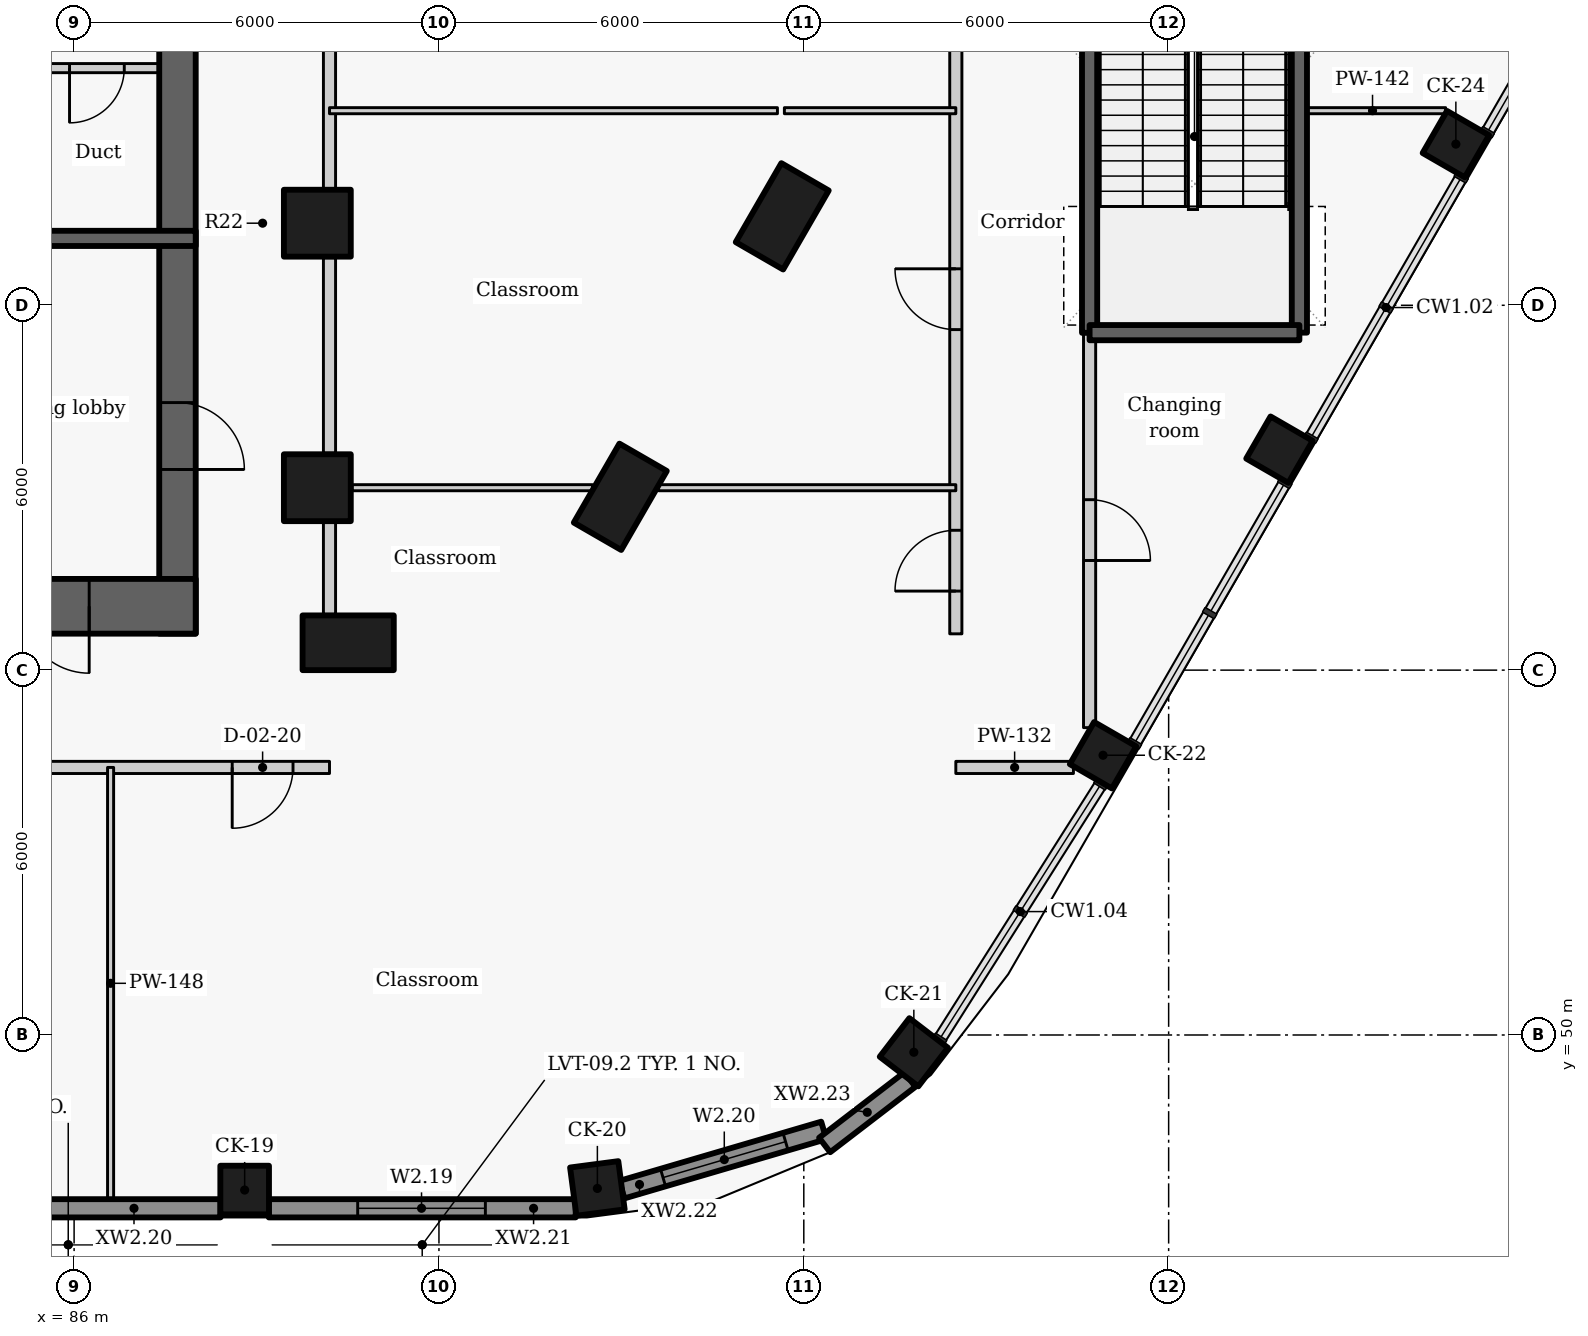
"""IFC4 building model, lengths in metres.
Left out: names, types, materials, properties, quantities, classifications, styles, units other than length and angle.
Written with IfcOpenShell. Run it as: python <this file> out.ifc"""

import sys

from ifc_helpers import new_model, si_unit, direction, frame, frame_2d, origin, origin_2d, place, context, subcontext, project, spatial, rectangle, extrude, element, fill, save


model = new_model("IFC4")
c1 = context("Model", 3, precision=1e-05, world=origin(), true_north=direction((0.0, 1.0)))
c2 = subcontext(c1, "Body", "Model", "MODEL_VIEW")
j1 = project(units=[si_unit("LENGTHUNIT", "METRE"), si_unit("PLANEANGLEUNIT", "RADIAN")], contexts=[c1])
p1 = place(None, origin())
s1 = spatial("IfcSite", under=j1, at=p1, CompositionType="ELEMENT")
p2 = place(p1, origin())
s2 = spatial("IfcBuilding", under=s1, at=p2, CompositionType="ELEMENT")
p3 = place(p2, frame((0.0, 0.0, 19.8)))
s3 = spatial("IfcBuildingStorey", under=s2, at=p3, CompositionType="ELEMENT", Elevation=19.8)
for number, where, z_axis, x_axis in (
    (1, (90.507, 56.45, 0.0), (0.0, 0.0, 1.0), (1.0, 0.0, 0.0)),
    (2, (94.982, 58.851, 0.0), (0.0, 0.0, 1.0), (0.5, 0.866, 0.0)),
    (3, (97.646, 63.463, 0.0), (0.0, 0.0, 1.0), (0.5, 0.866, 0.0)),
):
    element("IfcColumn", number, at=place(p3, frame(where, z_axis=z_axis, x_axis=x_axis)), inside=s3, PredefinedType="COLUMN", context=c2, shape_type="SweptSolid", body=[
        extrude(rectangle(XDim=1.5, YDim=0.9, at=origin_2d()), origin(), (0.0, 0.0, 1.0), 4.2),
    ])
for number, where, z_axis, x_axis in (
    (4, (90.0, 59.0, 0.0), (0.0, 0.0, 1.0), (0.0, 1.0, 0.0)),
    (5, (90.0, 63.35, 0.0), (0.0, 0.0, 1.0), (0.0, 1.0, 0.0)),
):
    element("IfcColumn", number, at=place(p3, frame(where, z_axis=z_axis, x_axis=x_axis)), inside=s3, PredefinedType="COLUMN", context=c2, shape_type="SweptSolid", body=[
        extrude(rectangle(XDim=1.1, YDim=1.1, at=origin_2d()), origin(), (0.0, 0.0, 1.0), 4.2),
    ])
for number, where, z_axis, x_axis in (
    (6, (88.805, 47.45, 0.0), (0.0, 0.0, 1.0), (1.0, 0.0, 0.0)),
    (7, (94.605, 47.477, 0.0), (0.0, 0.0, 1.0), (0.991, 0.131, 0.0)),
    (8, (99.81, 49.716, 0.0), (0.0, 0.0, 1.0), (0.609, 0.793, 0.0)),
    (9, (102.921, 54.6, 0.0), (0.0, 0.0, 1.0), (0.5, 0.866, 0.0)),
    (10, (105.822, 59.625, 0.0), (0.0, 0.0, 1.0), (0.5, 0.866, 0.0)),
    (11, (108.723, 64.65, 0.0), (0.0, 0.0, 1.0), (0.5, 0.866, 0.0)),
):
    element("IfcColumn", number, at=place(p3, frame(where, z_axis=z_axis, x_axis=x_axis)), inside=s3, PredefinedType="COLUMN", context=c2, shape_type="SweptSolid", body=[
        extrude(rectangle(XDim=0.8, YDim=0.8, at=origin_2d()), origin(), (0.0, 0.0, 1.0), 4.2),
    ])
p4 = place(p3, frame((83.398, 47.15, 0.0), z_axis=(0.0, 0.0, 1.0), x_axis=(1.0, 0.0, 0.0)))
e12 = element("IfcWall", 12, at=p4, inside=s3, PredefinedType="SOLIDWALL", context=c2, shape_type="SweptSolid", body=[
    extrude(rectangle(XDim=5.01, YDim=0.3, at=frame_2d((2.505, 0.0))), origin(), (0.0, 0.0, 1.0), 3.0),
])
p5 = place(p4, frame((1.163, 0.0, 1.5)))
e13 = element("IfcOpeningElement", 13, at=p5, cuts=e12, PredefinedType="OPENING", context=c2, shape_type="SweptSolid", body=[
    extrude(rectangle(XDim=0.9, YDim=1.45, at=frame_2d((0.45, 0.725))), frame((0.0, 0.16, 0.0), z_axis=(0.0, -1.0, 0.0), x_axis=(1.0, 0.0, 0.0)), (0.0, 0.0, 1.0), 0.32),
])
p6 = place(p3, frame((89.201, 47.15, 0.0), z_axis=(0.0, 0.0, 1.0), x_axis=(1.0, 0.0, 0.0)))
e14 = element("IfcWall", 14, at=p6, inside=s3, PredefinedType="SOLIDWALL", context=c2, shape_type="SweptSolid", body=[
    extrude(rectangle(XDim=5.048, YDim=0.3, at=frame_2d((2.524, 0.0))), origin(), (0.0, 0.0, 1.0), 3.0),
])
p7 = place(p6, frame((1.463, 0.0, 0.9)))
e15 = element("IfcOpeningElement", 15, at=p7, cuts=e14, PredefinedType="OPENING", context=c2, shape_type="SweptSolid", body=[
    extrude(rectangle(XDim=2.1, YDim=2.05, at=frame_2d((1.05, 1.025))), frame((0.0, 0.16, 0.0), z_axis=(0.0, -1.0, 0.0), x_axis=(1.0, 0.0, 0.0)), (0.0, 0.0, 1.0), 0.32),
])
p8 = place(p3, frame((95.007, 47.457, 0.0), z_axis=(0.0, 0.0, 1.0), x_axis=(0.959578633815, 0.281440660756, 0.0)))
e16 = element("IfcWall", 16, at=p8, inside=s3, PredefinedType="SOLIDWALL", context=c2, shape_type="SweptSolid", body=[
    extrude(rectangle(XDim=3.461, YDim=0.3, at=frame_2d((1.73, 0.0))), origin(), (0.0, 0.0, 1.0), 3.0),
])
p9 = place(p8, frame((0.706, 0.0, 0.9)))
e17 = element("IfcOpeningElement", 17, at=p9, cuts=e16, PredefinedType="OPENING", context=c2, shape_type="SweptSolid", body=[
    extrude(rectangle(XDim=2.1, YDim=2.05, at=frame_2d((1.05, 1.025))), frame((0.0, 0.16, 0.0), z_axis=(0.0, -1.0, 0.0), x_axis=(1.0, 0.0, 0.0)), (0.0, 0.0, 1.0), 0.32),
])
p10 = place(p3, frame((98.343, 48.191, 0.0), z_axis=(0.0, 0.0, 1.0), x_axis=(0.793403972369, 0.608695438318, 0.0)))
e18 = element("IfcWall", 18, at=p10, inside=s3, PredefinedType="SOLIDWALL", context=c2, shape_type="SweptSolid", body=[
    extrude(rectangle(XDim=1.767, YDim=0.3, at=frame_2d((0.884, 0.0))), origin(), (0.0, 0.0, 1.0), 3.0),
])
p11 = place(p3, frame((87.7, 72.2, -0.3), z_axis=(0.0, 0.0, 1.0), x_axis=(0.0, -1.0, 0.0)))
e19 = element("IfcWall", 19, at=p11, inside=s3, PredefinedType="SHEAR", context=c2, shape_type="SweptSolid", body=[
    extrude(rectangle(XDim=15.6, YDim=0.6, at=frame_2d((7.8, 0.0))), origin(), (0.0, 0.0, 1.0), 4.2),
])
p12 = place(p11, frame((11.8, 0.0, 0.3)))
e20 = element("IfcOpeningElement", 20, at=p12, cuts=e19, PredefinedType="OPENING", context=c2, shape_type="SweptSolid", body=[
    extrude(rectangle(XDim=1.1, YDim=2.1, at=frame_2d((0.55, 1.05))), frame((0.0, 0.31, 0.0), z_axis=(0.0, -1.0, 0.0), x_axis=(1.0, 0.0, 0.0)), (0.0, 0.0, 1.0), 0.62),
])
p13 = place(p3, frame((88.0, 65.9, 0.0), z_axis=(0.0, 0.0, 1.0), x_axis=(-1.0, 0.0, 0.0)))
e21 = element("IfcWall", 21, at=p13, inside=s3, PredefinedType="PARTITIONING", context=c2, shape_type="SweptSolid", body=[
    extrude(rectangle(XDim=2.603, YDim=0.15, at=frame_2d((1.302, 0.0))), origin(), (0.0, 0.0, 1.0), 3.9),
])
p14 = place(p13, frame((1.175, 0.0, 0.0)))
e22 = element("IfcOpeningElement", 22, at=p14, cuts=e21, PredefinedType="OPENING", context=c2, shape_type="SweptSolid", body=[
    extrude(rectangle(XDim=0.9, YDim=2.1, at=frame_2d((0.45, 1.05))), frame((0.0, 0.085, 0.0), z_axis=(0.0, -1.0, 0.0), x_axis=(1.0, 0.0, 0.0)), (0.0, 0.0, 1.0), 0.17),
])
p15 = place(p3, frame((80.0, 63.1, -0.3), z_axis=(0.0, 0.0, 1.0), x_axis=(1.0, 0.0, 0.0)))
e23 = element("IfcWall", 23, at=p15, inside=s3, PredefinedType="SHEAR", context=c2, shape_type="SweptSolid", body=[
    extrude(rectangle(XDim=8.0, YDim=0.25, at=frame_2d((4.0, 0.0))), origin(), (0.0, 0.0, 1.0), 4.2),
])
p16 = place(p15, frame((3.849, 0.0, 0.3)))
e24 = element("IfcOpeningElement", 24, at=p16, cuts=e23, PredefinedType="OPENING", context=c2, shape_type="SweptSolid", body=[
    extrude(rectangle(XDim=1.1, YDim=2.1, at=frame_2d((0.55, 1.05))), frame((0.0, 0.135, 0.0), z_axis=(0.0, -1.0, 0.0), x_axis=(1.0, 0.0, 0.0)), (0.0, 0.0, 1.0), 0.27),
])
p17 = place(p3, frame((88.0, 57.05, -0.3), z_axis=(0.0, 0.0, 1.0), x_axis=(-1.0, 0.0, 0.0)))
e25 = element("IfcWall", 25, at=p17, inside=s3, PredefinedType="SHEAR", context=c2, shape_type="SweptSolid", body=[
    extrude(rectangle(XDim=4.6, YDim=0.9, at=frame_2d((2.3, 0.0))), origin(), (0.0, 0.0, 1.0), 4.2),
])
p18 = place(p17, frame((1.752, 0.0, 0.3)))
e26 = element("IfcOpeningElement", 26, at=p18, cuts=e25, PredefinedType="OPENING", context=c2, shape_type="SweptSolid", body=[
    extrude(rectangle(XDim=1.1, YDim=2.1, at=frame_2d((0.55, 1.05))), frame((0.0, 0.46, 0.0), z_axis=(0.0, -1.0, 0.0), x_axis=(1.0, 0.0, 0.0)), (0.0, 0.0, 1.0), 0.92),
])
p19 = place(p3, frame((102.7, 61.547, -0.3), z_axis=(0.0, 0.0, 1.0), x_axis=(0.0, 1.0, 0.0)))
e27 = element("IfcWall", 27, at=p19, inside=s3, PredefinedType="SHEAR", context=c2, shape_type="SweptSolid", body=[
    extrude(rectangle(XDim=6.456, YDim=0.25, at=frame_2d((3.228, 0.0))), origin(), (0.0, 0.0, 1.0), 4.2),
])
p20 = place(p19, frame((5.306, 0.0, 0.3)))
e28 = element("IfcOpeningElement", 28, at=p20, cuts=e27, PredefinedType="OPENING", context=c2, shape_type="SweptSolid", body=[
    extrude(rectangle(XDim=0.9, YDim=2.1, at=frame_2d((0.45, 1.05))), frame((0.0, 0.135, 0.0), z_axis=(0.0, -1.0, 0.0), x_axis=(1.0, 0.0, 0.0)), (0.0, 0.0, 1.0), 0.27),
])
p21 = place(p3, frame((102.7, 61.553, 0.0), z_axis=(0.0, 0.0, 1.0), x_axis=(0.0, -1.0, 0.0)))
e29 = element("IfcWall", 29, at=p21, inside=s3, PredefinedType="PARTITIONING", context=c2, shape_type="SweptSolid", body=[
    extrude(rectangle(XDim=6.499, YDim=0.2, at=frame_2d((3.249, 0.0))), origin(), (0.0, 0.0, 1.0), 3.9),
])
p22 = place(p21, frame((2.75, 0.0, 0.0)))
e30 = element("IfcOpeningElement", 30, at=p22, cuts=e29, PredefinedType="OPENING", context=c2, shape_type="SweptSolid", body=[
    extrude(rectangle(XDim=1.0, YDim=2.1, at=frame_2d((0.5, 1.05))), frame((0.0, 0.11, 0.0), z_axis=(0.0, -1.0, 0.0), x_axis=(1.0, 0.0, 0.0)), (0.0, 0.0, 1.0), 0.22),
])
p23 = place(p3, frame((100.5, 56.597, 0.0), z_axis=(0.0, 0.0, 1.0), x_axis=(0.0, 1.0, 0.0)))
e31 = element("IfcWall", 31, at=p23, inside=s3, PredefinedType="PARTITIONING", context=c2, shape_type="SweptSolid", body=[
    extrude(rectangle(XDim=10.873, YDim=0.2, at=frame_2d((5.437, 0.0))), origin(), (0.0, 0.0, 1.0), 3.9),
])
p24 = place(p23, frame((5.003, 0.0, 0.0)))
e32 = element("IfcOpeningElement", 32, at=p24, cuts=e31, PredefinedType="OPENING", context=c2, shape_type="SweptSolid", body=[
    extrude(rectangle(XDim=1.0, YDim=2.1, at=frame_2d((0.5, 1.05))), frame((0.0, 0.11, 0.0), z_axis=(0.0, -1.0, 0.0), x_axis=(1.0, 0.0, 0.0)), (0.0, 0.0, 1.0), 0.22),
])
p25 = place(p23, frame((0.703, 0.0, 0.0)))
e33 = element("IfcOpeningElement", 33, at=p25, cuts=e31, PredefinedType="OPENING", context=c2, shape_type="SweptSolid", body=[
    extrude(rectangle(XDim=1.0, YDim=2.1, at=frame_2d((0.5, 1.05))), frame((0.0, 0.11, 0.0), z_axis=(0.0, -1.0, 0.0), x_axis=(1.0, 0.0, 0.0)), (0.0, 0.0, 1.0), 0.22),
])
p26 = place(p3, frame((90.2, 56.917, 0.0), z_axis=(0.0, 0.0, 1.0), x_axis=(0.0, 1.0, 0.0)))
e34 = element("IfcWall", 34, at=p26, inside=s3, PredefinedType="PARTITIONING", context=c2, shape_type="SweptSolid", body=[
    extrude(rectangle(XDim=1.516, YDim=0.2, at=frame_2d((0.758, 0.0))), origin(), (0.0, 0.0, 1.0), 3.9),
])
for number, where, z_axis, x_axis in (
    (35, (90.2, 59.567, 0.0), (0.0, 0.0, 1.0), (0.0, 1.0, 0.0)),
    (36, (90.2, 63.917, 0.0), (0.0, 0.0, 1.0), (0.0, 1.0, 0.0)),
):
    element("IfcWall", number, at=place(p3, frame(where, z_axis=z_axis, x_axis=x_axis)), inside=s3, PredefinedType="PARTITIONING", context=c2, shape_type="SweptSolid", body=[
        extrude(rectangle(XDim=3.216, YDim=0.2, at=frame_2d((1.608, 0.0))), origin(), (0.0, 0.0, 1.0), 3.13),
    ])
p27 = place(p3, frame((106.15, 61.55, -0.3), z_axis=(0.0, 0.0, 1.0), x_axis=(0.0, 1.0, 0.0)))
e37 = element("IfcWall", 37, at=p27, inside=s3, PredefinedType="SHEAR", context=c2, shape_type="SweptSolid", body=[
    extrude(rectangle(XDim=6.45, YDim=0.25, at=frame_2d((3.225, 0.0))), origin(), (0.0, 0.0, 1.0), 4.2),
])
p28 = place(p3, frame((90.2, 54.4, 0.0), z_axis=(0.0, 0.0, 1.0), x_axis=(-1.0, 0.0, 0.0)))
e38 = element("IfcWall", 38, at=p28, inside=s3, PredefinedType="PARTITIONING", context=c2, shape_type="SweptSolid", body=[
    extrude(rectangle(XDim=20.4, YDim=0.2, at=frame_2d((10.2, 0.0))), origin(), (0.0, 0.0, 1.0), 3.9),
])
p29 = place(p28, frame((18.8, 0.0, 0.0)))
e39 = element("IfcOpeningElement", 39, at=p29, cuts=e38, PredefinedType="OPENING", context=c2, shape_type="SweptSolid", body=[
    extrude(rectangle(XDim=1.0, YDim=2.1, at=frame_2d((0.5, 1.05))), frame((0.0, 0.11, 0.0), z_axis=(0.0, -1.0, 0.0), x_axis=(1.0, 0.0, 0.0)), (0.0, 0.0, 1.0), 0.22),
])
p30 = place(p28, frame((0.6, 0.0, 0.0)))
e40 = element("IfcOpeningElement", 40, at=p30, cuts=e38, PredefinedType="OPENING", context=c2, shape_type="SweptSolid", body=[
    extrude(rectangle(XDim=1.0, YDim=2.1, at=frame_2d((0.5, 1.05))), frame((0.0, 0.11, 0.0), z_axis=(0.0, -1.0, 0.0), x_axis=(1.0, 0.0, 0.0)), (0.0, 0.0, 1.0), 0.22),
])
p31 = place(p28, frame((10.1, 0.0, 0.0)))
e41 = element("IfcOpeningElement", 41, at=p31, cuts=e38, PredefinedType="OPENING", context=c2, shape_type="SweptSolid", body=[
    extrude(rectangle(XDim=1.0, YDim=2.1, at=frame_2d((0.5, 1.05))), frame((0.0, 0.11, 0.0), z_axis=(0.0, -1.0, 0.0), x_axis=(1.0, 0.0, 0.0)), (0.0, 0.0, 1.0), 0.22),
])
p32 = place(p3, frame((100.5, 54.4, 0.0), z_axis=(0.0, 0.0, 1.0), x_axis=(1.0, 0.0, 0.0)))
e42 = element("IfcWall", 42, at=p32, inside=s3, PredefinedType="PARTITIONING", context=c2, shape_type="SweptSolid", body=[
    extrude(rectangle(XDim=1.934, YDim=0.2, at=frame_2d((0.967, 0.0))), origin(), (0.0, 0.0, 1.0), 3.9),
])
p33 = place(p3, frame((102.7, 61.55, -0.3), z_axis=(0.0, 0.0, 1.0), x_axis=(1.0, 0.0, 0.0)))
e43 = element("IfcWall", 43, at=p33, inside=s3, PredefinedType="SHEAR", context=c2, shape_type="SweptSolid", body=[
    extrude(rectangle(XDim=3.45, YDim=0.25, at=frame_2d((1.725, 0.0))), origin(), (0.0, 0.0, 1.0), 4.2),
])
p34 = place(p3, frame((90.2, 65.2, 0.0), z_axis=(0.0, 0.0, 1.0), x_axis=(1.0, 0.0, 0.0)))
e44 = element("IfcWall", 44, at=p34, inside=s3, PredefinedType="PARTITIONING", context=c2, shape_type="SweptSolid", body=[
    extrude(rectangle(XDim=7.366, YDim=0.1, at=frame_2d((3.683, 0.0))), origin(), (0.0, 0.0, 1.0), 3.9),
])
p35 = place(p3, frame((97.68, 65.2, 0.0), z_axis=(0.0, 0.0, 1.0), x_axis=(1.0, 0.0, 0.0)))
e45 = element("IfcWall", 45, at=p35, inside=s3, PredefinedType="PARTITIONING", context=c2, shape_type="SweptSolid", body=[
    extrude(rectangle(XDim=2.82, YDim=0.1, at=frame_2d((1.41, 0.0))), origin(), (0.0, 0.0, 1.0), 2.98),
])
p36 = place(p3, frame((106.15, 65.2, 0.0), z_axis=(0.0, 0.0, 1.0), x_axis=(1.0, 0.0, 0.0)))
e46 = element("IfcWall", 46, at=p36, inside=s3, PredefinedType="PARTITIONING", context=c2, shape_type="SweptSolid", body=[
    extrude(rectangle(XDim=2.406, YDim=0.1, at=frame_2d((1.203, 0.0))), origin(), (0.0, 0.0, 1.0), 3.9),
])
p37 = place(p3, frame((90.57, 59.0, 0.0), z_axis=(0.0, 0.0, 1.0), x_axis=(1.0, 0.0, 0.0)))
e47 = element("IfcWall", 47, at=p37, inside=s3, PredefinedType="PARTITIONING", context=c2, shape_type="SweptSolid", body=[
    extrude(rectangle(XDim=3.956, YDim=0.1, at=frame_2d((1.978, 0.0))), origin(), (0.0, 0.0, 1.0), 3.9),
])
p38 = place(p3, frame((95.612, 59.0, 0.0), z_axis=(0.0, 0.0, 1.0), x_axis=(1.0, 0.0, 0.0)))
e48 = element("IfcWall", 48, at=p38, inside=s3, PredefinedType="PARTITIONING", context=c2, shape_type="SweptSolid", body=[
    extrude(rectangle(XDim=4.888, YDim=0.1, at=frame_2d((2.444, 0.0))), origin(), (0.0, 0.0, 1.0), 3.9),
])
p39 = place(p3, frame((86.6, 47.3, 0.0), z_axis=(0.0, 0.0, 1.0), x_axis=(0.0, 1.0, 0.0)))
e49 = element("IfcWall", 49, at=p39, inside=s3, PredefinedType="PARTITIONING", context=c2, shape_type="SweptSolid", body=[
    extrude(rectangle(XDim=7.1, YDim=0.1, at=frame_2d((3.55, 0.0))), origin(), (0.0, 0.0, 1.0), 3.13),
])
p40 = place(p7, origin())
e50 = element("IfcWindow", 50, at=p40, inside=s3, PartitioningType="SINGLE_PANEL", PredefinedType="WINDOW", context=c2, shape_type="SweptSolid", body=[
    extrude(rectangle(XDim=2.1, YDim=2.05, at=frame_2d((1.05, 1.025))), frame((0.0, 0.03, 0.0), z_axis=(0.0, -1.0, 0.0), x_axis=(1.0, 0.0, 0.0)), (0.0, 0.0, 1.0), 0.06),
])
fill(e15, e50)
p41 = place(p9, origin())
e51 = element("IfcWindow", 51, at=p41, inside=s3, PartitioningType="SINGLE_PANEL", PredefinedType="WINDOW", context=c2, shape_type="SweptSolid", body=[
    extrude(rectangle(XDim=2.1, YDim=2.05, at=frame_2d((1.05, 1.025))), frame((0.0, 0.03, 0.0), z_axis=(0.0, -1.0, 0.0), x_axis=(1.0, 0.0, 0.0)), (0.0, 0.0, 1.0), 0.06),
])
fill(e17, e51)
p42 = place(p14, origin())
e52 = element("IfcDoor", 52, at=p42, inside=s3, OperationType="SINGLE_SWING_RIGHT", PredefinedType="DOOR", context=c2, shape_type="SweptSolid", body=[
    extrude(rectangle(XDim=0.9, YDim=2.1, at=frame_2d((0.45, 1.05))), frame((0.0, 0.025, 0.0), z_axis=(0.0, -1.0, 0.0), x_axis=(1.0, 0.0, 0.0)), (0.0, 0.0, 1.0), 0.05),
])
fill(e22, e52)
p43 = place(p22, origin())
e53 = element("IfcDoor", 53, at=p43, inside=s3, OperationType="SINGLE_SWING_RIGHT", PredefinedType="DOOR", context=c2, shape_type="SweptSolid", body=[
    extrude(rectangle(XDim=1.0, YDim=2.1, at=frame_2d((0.5, 1.05))), frame((0.0, 0.025, 0.0), z_axis=(0.0, -1.0, 0.0), x_axis=(1.0, 0.0, 0.0)), (0.0, 0.0, 1.0), 0.05),
])
fill(e30, e53)
p44 = place(p24, origin())
e54 = element("IfcDoor", 54, at=p44, inside=s3, OperationType="SINGLE_SWING_RIGHT", PredefinedType="DOOR", context=c2, shape_type="SweptSolid", body=[
    extrude(rectangle(XDim=1.0, YDim=2.1, at=frame_2d((0.5, 1.05))), frame((0.0, 0.025, 0.0), z_axis=(0.0, -1.0, 0.0), x_axis=(1.0, 0.0, 0.0)), (0.0, 0.0, 1.0), 0.05),
])
fill(e32, e54)
p45 = place(p25, origin())
e55 = element("IfcDoor", 55, at=p45, inside=s3, OperationType="SINGLE_SWING_LEFT", PredefinedType="DOOR", context=c2, shape_type="SweptSolid", body=[
    extrude(rectangle(XDim=1.0, YDim=2.1, at=frame_2d((0.5, 1.05))), frame((0.0, 0.025, 0.0), z_axis=(0.0, -1.0, 0.0), x_axis=(1.0, 0.0, 0.0)), (0.0, 0.0, 1.0), 0.05),
])
fill(e33, e55)
p46 = place(p30, origin())
e56 = element("IfcDoor", 56, at=p46, inside=s3, OperationType="SINGLE_SWING_RIGHT", PredefinedType="DOOR", context=c2, shape_type="SweptSolid", body=[
    extrude(rectangle(XDim=1.0, YDim=2.1, at=frame_2d((0.5, 1.05))), frame((0.0, 0.025, 0.0), z_axis=(0.0, -1.0, 0.0), x_axis=(1.0, 0.0, 0.0)), (0.0, 0.0, 1.0), 0.05),
])
fill(e40, e56)
p47 = place(p12, origin())
e57 = element("IfcDoor", 57, at=p47, inside=s3, OperationType="SINGLE_SWING_RIGHT", PredefinedType="DOOR", context=c2, shape_type="SweptSolid", body=[
    extrude(rectangle(XDim=1.1, YDim=2.1, at=frame_2d((0.55, 1.05))), frame((0.0, 0.025, 0.0), z_axis=(0.0, -1.0, 0.0), x_axis=(1.0, 0.0, 0.0)), (0.0, 0.0, 1.0), 0.05),
])
fill(e20, e57)
p48 = place(p18, origin())
e58 = element("IfcDoor", 58, at=p48, inside=s3, OperationType="SINGLE_SWING_LEFT", PredefinedType="DOOR", context=c2, shape_type="SweptSolid", body=[
    extrude(rectangle(XDim=1.1, YDim=2.1, at=frame_2d((0.55, 1.05))), frame((0.0, 0.025, 0.0), z_axis=(0.0, -1.0, 0.0), x_axis=(1.0, 0.0, 0.0)), (0.0, 0.0, 1.0), 0.05),
])
fill(e26, e58)
save(model, sys.argv[1])
